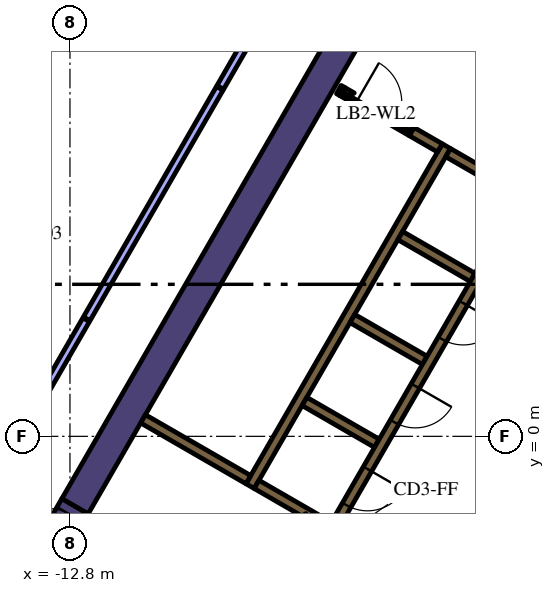
"""IFC4 building model, lengths in metres.
Left out: names, types, materials, properties, quantities, classifications, styles, units other than length and angle.
Written with IfcOpenShell. Run it as: python <this file> out.ifc"""

import sys

from ifc_helpers import new_model, si_unit, direction, frame, frame_2d, origin, place, context, subcontext, project, spatial, polyline, rectangle, outline, extrude, element, fill, save


model = new_model("IFC4")
c1 = context("Model", 3, precision=1e-05, world=origin(), true_north=direction((0.0, 1.0)))
c2 = subcontext(c1, "Body", "Model", "MODEL_VIEW")
j1 = project(units=[si_unit("LENGTHUNIT", "METRE"), si_unit("PLANEANGLEUNIT", "RADIAN")], contexts=[c1])
p1 = place(None, origin())
s1 = spatial("IfcSite", under=j1, at=p1, CompositionType="ELEMENT")
p2 = place(p1, origin())
s2 = spatial("IfcBuilding", under=s1, at=p2, CompositionType="ELEMENT")
p3 = place(p2, frame((0.0, 0.0, 187.8)))
s3 = spatial("IfcBuildingStorey", under=s2, at=p3, CompositionType="ELEMENT", Elevation=187.8)
p4 = place(p3, frame((-12.668, -1.842, 0.0), z_axis=(0.0, 0.0, 1.0), x_axis=(0.500003640647, 0.866023301845, 0.0)))
e1 = element("IfcWall", 1, at=p4, inside=s3, PredefinedType="SOLIDWALL", context=c2, shape_type="SweptSolid", body=[
    extrude(rectangle(XDim=15.858, YDim=0.8, at=frame_2d((7.929, 0.0))), origin(), (0.0, 0.0, 1.0), 4.2),
])
p5 = place(p3, frame((-8.06, -1.311, 0.0), z_axis=(0.0, 0.0, 1.0), x_axis=(0.50000273126, 0.866023826885, 0.0)))
e2 = element("IfcWall", 2, at=p5, inside=s3, PredefinedType="SOLIDWALL", context=c2, shape_type="SweptSolid", body=[
    extrude(rectangle(XDim=10.33, YDim=0.25, at=frame_2d((5.165, 0.0))), origin(), (0.0, 0.0, 1.0), 4.2),
])
p6 = place(p3, frame((-1.76, 6.836, 0.0), z_axis=(0.0, 0.0, 1.0), x_axis=(-0.865952863304, 0.500125622755, 0.0)))
e3 = element("IfcWall", 3, at=p6, inside=s3, PredefinedType="SOLIDWALL", context=c2, shape_type="SweptSolid", body=[
    extrude(rectangle(XDim=1.258, YDim=0.25, at=frame_2d((0.629, 0.0))), origin(), (0.0, 0.0, 1.0), 4.2),
])
for number, where, z_axis, x_axis in (
    (4, (-2.204, 4.182, 0.0), (0.0, 0.0, 1.0), (-0.866, 0.5, 0.0)),
    (5, (-5.369, 3.1, 0.0), (0.0, 0.0, 1.0), (0.866, -0.5, 0.0)),
    (6, (-4.724, -0.182, 0.0), (0.0, 0.0, 1.0), (-0.866, 0.5, 0.0)),
):
    element("IfcWall", number, at=place(p3, frame(where, z_axis=z_axis, x_axis=x_axis)), inside=s3, PredefinedType="SOLIDWALL", context=c2, shape_type="SweptSolid", body=[
        extrude(rectangle(XDim=2.2, YDim=0.25, at=frame_2d((1.1, 0.0))), origin(), (0.0, 0.0, 1.0), 4.2),
    ])
p7 = place(p3, origin())
e7 = element("IfcWall", 7, at=p7, inside=s3, PredefinedType="SOLIDWALL", context=c2, shape_type="SweptSolid", body=[
    extrude(outline(polyline([(-5.922, -2.257), (-5.922, -2.257), (-5.705, -2.382), (-5.83, -2.598), (-6.483, -2.221), (-6.591, -2.033), (-6.591, -2.033), (-6.7, -2.096), (-7.952, -1.373), (-7.827, -1.156), (-5.922, -2.257)])), origin(), (0.0, 0.0, 1.0), 4.2),
])
p8 = place(p3, frame((-8.106, -1.14, 0.0), z_axis=(0.0, 0.0, 1.0), x_axis=(-0.866008981251, 0.500028443584, 0.0)))
e8 = element("IfcWall", 8, at=p8, inside=s3, PredefinedType="SOLIDWALL", context=c2, shape_type="SweptSolid", body=[
    extrude(rectangle(XDim=3.2, YDim=0.25, at=frame_2d((1.6, 0.0))), origin(), (0.0, 0.0, 1.0), 4.2),
])
p9 = place(p3, frame((-5.725, 9.125, 0.0), z_axis=(0.0, 0.0, 1.0), x_axis=(0.866185586049, -0.49972245349, 0.0)))
e9 = element("IfcWall", 9, at=p9, inside=s3, PredefinedType="SOLIDWALL", context=c2, shape_type="SweptSolid", body=[
    extrude(rectangle(XDim=0.11, YDim=0.25, at=frame_2d((0.055, 0.0))), origin(), (0.0, 0.0, 1.0), 4.2),
])
p10 = place(p3, frame((-3.066, 7.59, 0.0), z_axis=(0.0, 0.0, 1.0), x_axis=(-0.866081358704, 0.49990307071, 0.0)))
e10 = element("IfcWall", 10, at=p10, inside=s3, PredefinedType="SOLIDWALL", context=c2, shape_type="SweptSolid", body=[
    extrude(rectangle(XDim=0.858, YDim=0.25, at=frame_2d((0.429, 0.0))), origin(), (0.0, 0.0, 1.0), 4.2),
])
e11 = element("IfcWall", 11, at=p7, inside=s3, PredefinedType="SOLIDWALL", context=c2, shape_type="SweptSolid", body=[
    extrude(outline(polyline([(-3.748, 8.128), (-3.813, 8.015), (-4.027, 8.139), (-4.017, 8.156), (-4.008, 8.173), (-4.0, 8.192), (-3.995, 8.21), (-3.991, 8.23), (-3.99, 8.25), (-3.99, 8.268), (-3.748, 8.128)])), origin(), (0.0, 0.0, 1.0), 4.2),
])
e12 = element("IfcWall", 12, at=p7, inside=s3, PredefinedType="SOLIDWALL", context=c2, shape_type="SweptSolid", body=[
    extrude(outline(polyline([(-5.689, 8.96), (-5.69, 8.961), (-5.565, 9.177), (-5.319, 9.035), (-5.335, 9.026), (-5.351, 9.015), (-5.366, 9.002), (-5.379, 8.988), (-5.392, 8.972), (-5.402, 8.956), (-5.412, 8.939), (-5.629, 9.064), (-5.629, 9.064), (-5.689, 8.96)])), origin(), (0.0, 0.0, 1.0), 4.2),
])
e13 = element("IfcWall", 13, at=p7, inside=s3, PredefinedType="PARTITIONING", context=c2, shape_type="SweptSolid", body=[
    extrude(outline(polyline([(-0.59, -0.872), (-0.265, -1.059), (-1.822, -3.756), (-2.147, -3.568), (-0.59, -0.872)])), origin(), (0.0, 0.0, 1.0), 3.15),
])
p11 = place(p3, frame((-0.898, 6.194, 0.0), z_axis=(0.0, 0.0, 1.0), x_axis=(-0.499996202215, -0.866027596426, 0.0)))
e14 = element("IfcWall", 14, at=p11, inside=s3, PredefinedType="SOLIDWALL", context=c2, shape_type="SweptSolid", body=[
    extrude(rectangle(XDim=9.83, YDim=0.25, at=frame_2d((4.915, 0.0))), origin(), (0.0, 0.0, 1.0), 4.2),
])
p12 = place(p11, frame((0.585, 0.0, 0.0)))
e15 = element("IfcOpeningElement", 15, at=p12, cuts=e14, PredefinedType="OPENING", context=c2, shape_type="SweptSolid", body=[
    extrude(rectangle(XDim=1.1, YDim=2.1, at=frame_2d((0.55, 1.05))), frame((0.0, 0.135, 0.0), z_axis=(0.0, -1.0, 0.0), x_axis=(1.0, 0.0, 0.0)), (0.0, 0.0, 1.0), 0.27),
])
p13 = place(p11, frame((3.105, 0.0, 0.0)))
e16 = element("IfcOpeningElement", 16, at=p13, cuts=e14, PredefinedType="OPENING", context=c2, shape_type="SweptSolid", body=[
    extrude(rectangle(XDim=1.1, YDim=2.1, at=frame_2d((0.55, 1.05))), frame((0.0, 0.135, 0.0), z_axis=(0.0, -1.0, 0.0), x_axis=(1.0, 0.0, 0.0)), (0.0, 0.0, 1.0), 0.27),
])
p14 = place(p11, frame((5.625, 0.0, 0.0)))
e17 = element("IfcOpeningElement", 17, at=p14, cuts=e14, PredefinedType="OPENING", context=c2, shape_type="SweptSolid", body=[
    extrude(rectangle(XDim=1.1, YDim=2.1, at=frame_2d((0.55, 1.05))), frame((0.0, 0.135, 0.0), z_axis=(0.0, -1.0, 0.0), x_axis=(1.0, 0.0, 0.0)), (0.0, 0.0, 1.0), 0.27),
])
p15 = place(p11, frame((8.145, 0.0, 0.0)))
e18 = element("IfcOpeningElement", 18, at=p15, cuts=e14, PredefinedType="OPENING", context=c2, shape_type="SweptSolid", body=[
    extrude(rectangle(XDim=1.1, YDim=2.1, at=frame_2d((0.55, 1.05))), frame((0.0, 0.135, 0.0), z_axis=(0.0, -1.0, 0.0), x_axis=(1.0, 0.0, 0.0)), (0.0, 0.0, 1.0), 0.27),
])
p16 = place(p3, frame((-5.659, 9.012, 0.0), z_axis=(0.0, 0.0, 1.0), x_axis=(0.866009402589, -0.500027713859, 0.0)))
e19 = element("IfcWall", 19, at=p16, inside=s3, PredefinedType="PARTITIONING", context=c2, shape_type="SweptSolid", body=[
    extrude(rectangle(XDim=2.1, YDim=0.12, at=frame_2d((1.05, 0.0))), origin(), (0.0, 0.0, 1.0), 3.15),
])
p17 = place(p16, frame((0.45, 0.0, 0.0)))
e20 = element("IfcOpeningElement", 20, at=p17, cuts=e19, PredefinedType="OPENING", context=c2, shape_type="SweptSolid", body=[
    extrude(rectangle(XDim=1.2, YDim=2.1, at=frame_2d((0.6, 1.05))), frame((0.0, 0.07, 0.0), z_axis=(0.0, -1.0, 0.0), x_axis=(1.0, 0.0, 0.0)), (0.0, 0.0, 1.0), 0.14),
])
p18 = place(p3, frame((-13.518, -3.314, 0.0), z_axis=(0.0, 0.0, 1.0), x_axis=(0.500000056704, 0.866025371046, 0.0)))
e21 = element("IfcWall", 21, at=p18, inside=s3, PredefinedType="SOLIDWALL", context=c2, shape_type="SweptSolid", body=[
    extrude(rectangle(XDim=1.7, YDim=0.8, at=frame_2d((0.85, 0.0))), origin(), (0.0, 0.0, 1.0), 4.2),
])
p19 = place(p18, frame((0.25, 0.0, 0.0)))
e22 = element("IfcOpeningElement", 22, at=p19, cuts=e21, PredefinedType="OPENING", context=c2, shape_type="SweptSolid", body=[
    extrude(rectangle(XDim=1.2, YDim=2.1, at=frame_2d((0.6, 1.05))), frame((0.0, 0.41, 0.0), z_axis=(0.0, -1.0, 0.0), x_axis=(1.0, 0.0, 0.0)), (0.0, 0.0, 1.0), 0.82),
])
p20 = place(p3, frame((-8.859, 9.156, 0.0), z_axis=(0.0, 0.0, 1.0), x_axis=(-0.500010275428, -0.866019471182, 0.0)))
e23 = element("IfcWall", 23, at=p20, inside=s3, PredefinedType="PARTITIONING", context=c2, shape_type="SweptSolid", body=[
    extrude(rectangle(XDim=7.0, YDim=0.2, at=frame_2d((3.5, 0.0))), origin(), (0.0, 0.0, 1.0), 3.15),
])
p21 = place(p3, frame((-12.374, 3.068, 0.0), z_axis=(0.0, 0.0, 1.0), x_axis=(-0.50000000053, -0.866025403479, 0.0)))
e24 = element("IfcWall", 24, at=p21, inside=s3, PredefinedType="PARTITIONING", context=c2, shape_type="SweptSolid", body=[
    extrude(rectangle(XDim=9.188, YDim=0.2, at=frame_2d((4.594, 0.0))), origin(), (0.0, 0.0, 1.0), 3.15),
])
p22 = place(p21, frame((4.1, 0.0, 0.0)))
e25 = element("IfcOpeningElement", 25, at=p22, cuts=e24, PredefinedType="OPENING", context=c2, shape_type="SweptSolid", body=[
    extrude(rectangle(XDim=1.0, YDim=2.1, at=frame_2d((0.5, 1.05))), frame((0.0, 0.11, 0.0), z_axis=(0.0, -1.0, 0.0), x_axis=(1.0, 0.0, 0.0)), (0.0, 0.0, 1.0), 0.22),
])
p23 = place(p3, frame((-7.453, 11.591, 0.0), z_axis=(0.0, 0.0, 1.0), x_axis=(-0.499980749935, -0.866036517529, 0.0)))
e26 = element("IfcWall", 26, at=p23, inside=s3, PredefinedType="PARTITIONING", context=c2, shape_type="SweptSolid", body=[
    extrude(rectangle(XDim=2.782, YDim=0.2, at=frame_2d((1.391, 0.0))), origin(), (0.0, 0.0, 1.0), 3.15),
])
p24 = place(p13, origin())
e27 = element("IfcDoor", 27, at=p24, inside=s3, OperationType="DOUBLE_DOOR_SLIDING", PredefinedType="DOOR", context=c2, shape_type="SweptSolid", body=[
    extrude(rectangle(XDim=1.1, YDim=2.1, at=frame_2d((0.55, 1.05))), frame((0.0, 0.025, 0.0), z_axis=(0.0, -1.0, 0.0), x_axis=(1.0, 0.0, 0.0)), (0.0, 0.0, 1.0), 0.05),
])
fill(e16, e27)
p25 = place(p14, origin())
e28 = element("IfcDoor", 28, at=p25, inside=s3, OperationType="DOUBLE_DOOR_SLIDING", PredefinedType="DOOR", context=c2, shape_type="SweptSolid", body=[
    extrude(rectangle(XDim=1.1, YDim=2.1, at=frame_2d((0.55, 1.05))), frame((0.0, 0.025, 0.0), z_axis=(0.0, -1.0, 0.0), x_axis=(1.0, 0.0, 0.0)), (0.0, 0.0, 1.0), 0.05),
])
fill(e17, e28)
p26 = place(p15, origin())
e29 = element("IfcDoor", 29, at=p26, inside=s3, OperationType="DOUBLE_DOOR_SLIDING", PredefinedType="DOOR", context=c2, shape_type="SweptSolid", body=[
    extrude(rectangle(XDim=1.1, YDim=2.1, at=frame_2d((0.55, 1.05))), frame((0.0, 0.025, 0.0), z_axis=(0.0, -1.0, 0.0), x_axis=(1.0, 0.0, 0.0)), (0.0, 0.0, 1.0), 0.05),
])
fill(e18, e29)
p27 = place(p17, origin())
e30 = element("IfcDoor", 30, at=p27, inside=s3, OperationType="SINGLE_SWING_LEFT", PredefinedType="DOOR", context=c2, shape_type="SweptSolid", body=[
    extrude(rectangle(XDim=1.2, YDim=2.1, at=frame_2d((0.6, 1.05))), frame((0.0, 0.025, 0.0), z_axis=(0.0, -1.0, 0.0), x_axis=(1.0, 0.0, 0.0)), (0.0, 0.0, 1.0), 0.05),
])
fill(e20, e30)
save(model, sys.argv[1])
